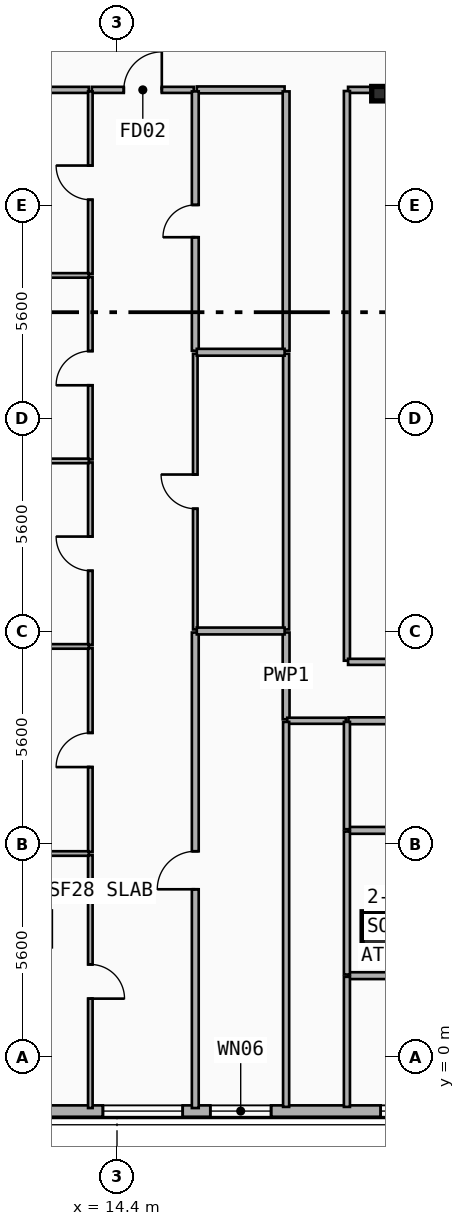
"""IFC4 building model, lengths in metres.
Left out: names, types, materials, properties, quantities, classifications, styles, units other than length and angle.
Written with IfcOpenShell. Run it as: python <this file> out.ifc"""

import sys

from ifc_helpers import new_model, si_unit, direction, frame, frame_2d, origin, origin_2d, place, context, subcontext, project, spatial, rectangle, i_section, extrude, element, fill, save


model = new_model("IFC4")
c1 = context("Model", 3, precision=1e-05, world=origin(), true_north=direction((0.0, 1.0)))
c2 = subcontext(c1, "Body", "Model", "MODEL_VIEW")
j1 = project(units=[si_unit("LENGTHUNIT", "METRE"), si_unit("PLANEANGLEUNIT", "RADIAN")], contexts=[c1])
p1 = place(None, origin())
s1 = spatial("IfcSite", under=j1, at=p1, CompositionType="ELEMENT")
p2 = place(p1, origin())
s2 = spatial("IfcBuilding", under=s1, at=p2, CompositionType="ELEMENT")
p3 = place(p2, frame((0.0, 0.0, 251.0)))
s3 = spatial("IfcBuildingStorey", under=s2, at=p3, CompositionType="ELEMENT", Elevation=251.0)
p4 = place(p3, frame((21.3, 25.35, 0.0), z_axis=(0.0, 0.0, 1.0), x_axis=(1.0, 0.0, 0.0)))
e1 = element("IfcColumn", 1, at=p4, inside=s3, PredefinedType="COLUMN", context=c2, shape_type="SweptSolid", body=[
    extrude(i_section(OverallWidth=0.395, OverallDepth=0.38, WebThickness=0.019, FlangeThickness=0.03, FilletRadius=0.015, at=origin_2d()), origin(), (0.0, 0.0, 1.0), 3.7),
])
p5 = place(p3, frame((21.3, 3.482, 0.0), z_axis=(0.0, -0.090227632116, 0.995921168769), x_axis=(1.0, 0.0, 0.0)))
e2 = element("IfcColumn", 2, at=p5, inside=s3, PredefinedType="COLUMN", context=c2, shape_type="SweptSolid", body=[
    extrude(rectangle(XDim=0.9, YDim=0.9, at=origin_2d()), origin(), (0.0, 0.0, 1.0), 3.715),
])
p6 = place(p3, frame((45.2, -1.42, 0.0), z_axis=(0.0, 0.0, 1.0), x_axis=(-1.0, 0.0, 0.0)))
e3 = element("IfcWall", 3, at=p6, inside=s3, PredefinedType="SOLIDWALL", context=c2, shape_type="SweptSolid", body=[
    extrude(rectangle(XDim=32.8, YDim=0.3, at=frame_2d((16.4, 0.0))), origin(), (0.0, 0.0, 1.0), 3.42),
])
p7 = place(p6, frame((29.071, 0.0, 0.75)))
e4 = element("IfcOpeningElement", 4, at=p7, cuts=e3, PredefinedType="OPENING", context=c2, shape_type="SweptSolid", body=[
    extrude(rectangle(XDim=2.1, YDim=2.1, at=frame_2d((1.05, 1.05))), frame((0.0, 0.16, 0.0), z_axis=(0.0, -1.0, 0.0), x_axis=(1.0, 0.0, 0.0)), (0.0, 0.0, 1.0), 0.32),
])
p8 = place(p6, frame((26.745, 0.0, 0.75)))
e5 = element("IfcOpeningElement", 5, at=p8, cuts=e3, PredefinedType="OPENING", context=c2, shape_type="SweptSolid", body=[
    extrude(rectangle(XDim=1.6, YDim=1.95, at=frame_2d((0.8, 0.975))), frame((0.0, 0.16, 0.0), z_axis=(0.0, -1.0, 0.0), x_axis=(1.0, 0.0, 0.0)), (0.0, 0.0, 1.0), 0.32),
])
p9 = place(p6, frame((18.105, 0.0, 0.75)))
e6 = element("IfcOpeningElement", 6, at=p9, cuts=e3, PredefinedType="OPENING", context=c2, shape_type="SweptSolid", body=[
    extrude(rectangle(XDim=2.1, YDim=2.1, at=frame_2d((1.05, 1.05))), frame((0.0, 0.16, 0.0), z_axis=(0.0, -1.0, 0.0), x_axis=(1.0, 0.0, 0.0)), (0.0, 0.0, 1.0), 0.32),
])
p10 = place(p6, frame((21.762, 0.0, 0.75)))
e7 = element("IfcOpeningElement", 7, at=p10, cuts=e3, PredefinedType="OPENING", context=c2, shape_type="SweptSolid", body=[
    extrude(rectangle(XDim=2.1, YDim=2.1, at=frame_2d((1.05, 1.05))), frame((0.0, 0.16, 0.0), z_axis=(0.0, -1.0, 0.0), x_axis=(1.0, 0.0, 0.0)), (0.0, 0.0, 1.0), 0.32),
])
p11 = place(p6, frame((11.364, 0.0, 0.75)))
e8 = element("IfcOpeningElement", 8, at=p11, cuts=e3, PredefinedType="OPENING", context=c2, shape_type="SweptSolid", body=[
    extrude(rectangle(XDim=2.1, YDim=2.1, at=frame_2d((1.05, 1.05))), frame((0.0, 0.16, 0.0), z_axis=(0.0, -1.0, 0.0), x_axis=(1.0, 0.0, 0.0)), (0.0, 0.0, 1.0), 0.32),
])
p12 = place(p6, frame((9.238, 0.0, 0.68)))
e9 = element("IfcOpeningElement", 9, at=p12, cuts=e3, PredefinedType="OPENING", context=c2, shape_type="SweptSolid", body=[
    extrude(rectangle(XDim=1.2, YDim=1.5, at=frame_2d((0.6, 0.75))), frame((0.0, 0.16, 0.0), z_axis=(0.0, -1.0, 0.0), x_axis=(1.0, 0.0, 0.0)), (0.0, 0.0, 1.0), 0.32),
])
p13 = place(p6, frame((14.669, 0.0, 0.75)))
e10 = element("IfcOpeningElement", 10, at=p13, cuts=e3, PredefinedType="OPENING", context=c2, shape_type="SweptSolid", body=[
    extrude(rectangle(XDim=2.1, YDim=2.1, at=frame_2d((1.05, 1.05))), frame((0.0, 0.16, 0.0), z_axis=(0.0, -1.0, 0.0), x_axis=(1.0, 0.0, 0.0)), (0.0, 0.0, 1.0), 0.32),
])
p14 = place(p6, frame((1.937, 0.0, 0.75)))
e11 = element("IfcOpeningElement", 11, at=p14, cuts=e3, PredefinedType="OPENING", context=c2, shape_type="SweptSolid", body=[
    extrude(rectangle(XDim=2.1, YDim=2.1, at=frame_2d((1.05, 1.05))), frame((0.0, 0.16, 0.0), z_axis=(0.0, -1.0, 0.0), x_axis=(1.0, 0.0, 0.0)), (0.0, 0.0, 1.0), 0.32),
])
p15 = place(p6, frame((4.709, 0.0, 0.8)))
e12 = element("IfcOpeningElement", 12, at=p15, cuts=e3, PredefinedType="OPENING", context=c2, shape_type="SweptSolid", body=[
    extrude(rectangle(XDim=1.8, YDim=1.8, at=frame_2d((0.9, 0.9))), frame((0.0, 0.16, 0.0), z_axis=(0.0, -1.0, 0.0), x_axis=(1.0, 0.0, 0.0)), (0.0, 0.0, 1.0), 0.32),
])
p16 = place(p3, frame((13.738, 25.45, 0.0), z_axis=(0.0, 0.0, 1.0), x_axis=(1.0, 0.0, 0.0)))
e13 = element("IfcWall", 13, at=p16, inside=s3, PredefinedType="PARTITIONING", context=c2, shape_type="SweptSolid", body=[
    extrude(rectangle(XDim=2.682, YDim=0.16, at=frame_2d((1.341, 0.0))), origin(), (0.0, 0.0, 1.0), 3.42),
])
p17 = place(p16, frame((0.841, 0.0, 0.0)))
e14 = element("IfcOpeningElement", 14, at=p17, cuts=e13, PredefinedType="OPENING", context=c2, shape_type="SweptSolid", body=[
    extrude(rectangle(XDim=1.0, YDim=2.15, at=frame_2d((0.5, 1.075))), frame((0.0, 0.09, 0.0), z_axis=(0.0, -1.0, 0.0), x_axis=(1.0, 0.0, 0.0)), (0.0, 0.0, 1.0), 0.18),
])
p18 = place(p3, frame((16.5, 25.45, 0.0), z_axis=(0.0, 0.0, 1.0), x_axis=(1.0, 0.0, 0.0)))
e15 = element("IfcWall", 15, at=p18, inside=s3, PredefinedType="PLUMBINGWALL", context=c2, shape_type="SweptSolid", body=[
    extrude(rectangle(XDim=2.31, YDim=0.18, at=frame_2d((1.155, 0.0))), origin(), (0.0, 0.0, 1.0), 3.42),
])
p19 = place(p3, frame((8.46, 25.45, 0.0), z_axis=(0.0, 0.0, 1.0), x_axis=(1.0, 0.0, 0.0)))
e16 = element("IfcWall", 16, at=p19, inside=s3, PredefinedType="PARTITIONING", context=c2, shape_type="SweptSolid", body=[
    extrude(rectangle(XDim=5.198, YDim=0.16, at=frame_2d((2.599, 0.0))), origin(), (0.0, 0.0, 1.0), 2.7),
])
p20 = place(p3, frame((18.85, 8.89, 0.0), z_axis=(0.0, 0.0, 1.0), x_axis=(0.0, 1.0, 0.0)))
e17 = element("IfcWall", 17, at=p20, inside=s3, PredefinedType="PLUMBINGWALL", context=c2, shape_type="SweptSolid", body=[
    extrude(rectangle(XDim=2.282, YDim=0.18, at=frame_2d((1.141, 0.0))), origin(), (0.0, 0.0, 1.0), 2.9),
])
p21 = place(p3, frame((18.85, 11.252, 0.0), z_axis=(0.0, 0.0, 1.0), x_axis=(0.0, 1.0, 0.0)))
e18 = element("IfcWall", 18, at=p21, inside=s3, PredefinedType="PARTITIONING", context=c2, shape_type="SweptSolid", body=[
    extrude(rectangle(XDim=7.254, YDim=0.16, at=frame_2d((3.627, 0.0))), origin(), (0.0, 0.0, 1.0), 2.9),
])
p22 = place(p3, frame((18.85, 18.586, 0.0), z_axis=(0.0, 0.0, 1.0), x_axis=(0.0, 1.0, 0.0)))
e19 = element("IfcWall", 19, at=p22, inside=s3, PredefinedType="PLUMBINGWALL", context=c2, shape_type="SweptSolid", body=[
    extrude(rectangle(XDim=6.824, YDim=0.18, at=frame_2d((3.412, 0.0))), origin(), (0.0, 0.0, 1.0), 2.9),
])
p23 = place(p3, frame((20.49, 8.85, 0.0), z_axis=(0.0, 0.0, 1.0), x_axis=(1.0, 0.0, 0.0)))
e20 = element("IfcWall", 20, at=p23, inside=s3, PredefinedType="PLUMBINGWALL", context=c2, shape_type="SweptSolid", body=[
    extrude(rectangle(XDim=3.796, YDim=0.18, at=frame_2d((1.898, 0.0))), origin(), (0.0, 0.0, 1.0), 2.7),
])
p24 = place(p3, frame((16.46, -1.34, 0.0), z_axis=(0.0, 0.0, 1.0), x_axis=(0.0, 1.0, 0.0)))
e21 = element("IfcWall", 21, at=p24, inside=s3, PredefinedType="PLUMBINGWALL", context=c2, shape_type="SweptSolid", body=[
    extrude(rectangle(XDim=12.512, YDim=0.18, at=frame_2d((6.256, 0.0))), origin(), (0.0, 0.0, 1.0), 2.9),
])
p25 = place(p24, frame((5.756, 0.0, 0.0)))
e22 = element("IfcOpeningElement", 22, at=p25, cuts=e21, PredefinedType="OPENING", context=c2, shape_type="SweptSolid", body=[
    extrude(rectangle(XDim=1.0, YDim=2.15, at=frame_2d((0.5, 1.075))), frame((0.0, 0.1, 0.0), z_axis=(0.0, -1.0, 0.0), x_axis=(1.0, 0.0, 0.0)), (0.0, 0.0, 1.0), 0.2),
])
p26 = place(p3, frame((16.46, 11.252, 0.0), z_axis=(0.0, 0.0, 1.0), x_axis=(0.0, 1.0, 0.0)))
e23 = element("IfcWall", 23, at=p26, inside=s3, PredefinedType="PARTITIONING", context=c2, shape_type="SweptSolid", body=[
    extrude(rectangle(XDim=7.254, YDim=0.12, at=frame_2d((3.627, 0.0))), origin(), (0.0, 0.0, 1.0), 2.9),
])
p27 = place(p26, frame((3.177, 0.0, 0.0)))
e24 = element("IfcOpeningElement", 24, at=p27, cuts=e23, PredefinedType="OPENING", context=c2, shape_type="SweptSolid", body=[
    extrude(rectangle(XDim=0.9, YDim=2.1, at=frame_2d((0.45, 1.05))), frame((0.0, 0.07, 0.0), z_axis=(0.0, -1.0, 0.0), x_axis=(1.0, 0.0, 0.0)), (0.0, 0.0, 1.0), 0.14),
])
p28 = place(p3, frame((16.46, 18.586, 0.0), z_axis=(0.0, 0.0, 1.0), x_axis=(0.0, 1.0, 0.0)))
e25 = element("IfcWall", 25, at=p28, inside=s3, PredefinedType="PLUMBINGWALL", context=c2, shape_type="SweptSolid", body=[
    extrude(rectangle(XDim=6.824, YDim=0.18, at=frame_2d((3.412, 0.0))), origin(), (0.0, 0.0, 1.0), 2.9),
])
p29 = place(p28, frame((2.987, 0.0, 0.0)))
e26 = element("IfcOpeningElement", 26, at=p29, cuts=e25, PredefinedType="OPENING", context=c2, shape_type="SweptSolid", body=[
    extrude(rectangle(XDim=0.85, YDim=2.1, at=frame_2d((0.425, 1.05))), frame((0.0, 0.1, 0.0), z_axis=(0.0, -1.0, 0.0), x_axis=(1.0, 0.0, 0.0)), (0.0, 0.0, 1.0), 0.2),
])
p30 = place(p3, frame((13.698, 5.317, 0.0), z_axis=(0.0, 0.0, 1.0), x_axis=(0.0, -1.0, 0.0)))
e27 = element("IfcWall", 27, at=p30, inside=s3, PredefinedType="PARTITIONING", context=c2, shape_type="SweptSolid", body=[
    extrude(rectangle(XDim=6.657, YDim=0.12, at=frame_2d((3.329, 0.0))), origin(), (0.0, 0.0, 1.0), 3.08),
])
p31 = place(p30, frame((2.878, 0.0, 0.0)))
e28 = element("IfcOpeningElement", 28, at=p31, cuts=e27, PredefinedType="OPENING", context=c2, shape_type="SweptSolid", body=[
    extrude(rectangle(XDim=0.9, YDim=2.1, at=frame_2d((0.45, 1.05))), frame((0.0, 0.07, 0.0), z_axis=(0.0, -1.0, 0.0), x_axis=(1.0, 0.0, 0.0)), (0.0, 0.0, 1.0), 0.14),
])
p32 = place(p3, frame((13.698, 5.397, 0.0), z_axis=(0.0, 0.0, 1.0), x_axis=(0.0, 1.0, 0.0)))
e29 = element("IfcWall", 29, at=p32, inside=s3, PredefinedType="PARTITIONING", context=c2, shape_type="SweptSolid", body=[
    extrude(rectangle(XDim=5.369, YDim=0.12, at=frame_2d((2.685, 0.0))), origin(), (0.0, 0.0, 1.0), 2.9),
])
p33 = place(p32, frame((2.235, 0.0, 0.0)))
e30 = element("IfcOpeningElement", 30, at=p33, cuts=e29, PredefinedType="OPENING", context=c2, shape_type="SweptSolid", body=[
    extrude(rectangle(XDim=0.9, YDim=2.1, at=frame_2d((0.45, 1.05))), frame((0.0, 0.07, 0.0), z_axis=(0.0, -1.0, 0.0), x_axis=(1.0, 0.0, 0.0)), (0.0, 0.0, 1.0), 0.14),
])
p34 = place(p3, frame((13.698, 10.846, 0.0), z_axis=(0.0, 0.0, 1.0), x_axis=(0.0, 1.0, 0.0)))
e31 = element("IfcWall", 31, at=p34, inside=s3, PredefinedType="PARTITIONING", context=c2, shape_type="SweptSolid", body=[
    extrude(rectangle(XDim=4.801, YDim=0.12, at=frame_2d((2.4, 0.0))), origin(), (0.0, 0.0, 1.0), 2.9),
])
p35 = place(p34, frame((1.95, 0.0, 0.0)))
e32 = element("IfcOpeningElement", 32, at=p35, cuts=e31, PredefinedType="OPENING", context=c2, shape_type="SweptSolid", body=[
    extrude(rectangle(XDim=0.9, YDim=2.1, at=frame_2d((0.45, 1.05))), frame((0.0, 0.07, 0.0), z_axis=(0.0, -1.0, 0.0), x_axis=(1.0, 0.0, 0.0)), (0.0, 0.0, 1.0), 0.14),
])
p36 = place(p3, frame((13.698, 15.727, 0.0), z_axis=(0.0, 0.0, 1.0), x_axis=(0.0, 1.0, 0.0)))
e33 = element("IfcWall", 33, at=p36, inside=s3, PredefinedType="PARTITIONING", context=c2, shape_type="SweptSolid", body=[
    extrude(rectangle(XDim=4.801, YDim=0.12, at=frame_2d((2.4, 0.0))), origin(), (0.0, 0.0, 1.0), 2.9),
])
p37 = place(p36, frame((1.95, 0.0, 0.0)))
e34 = element("IfcOpeningElement", 34, at=p37, cuts=e33, PredefinedType="OPENING", context=c2, shape_type="SweptSolid", body=[
    extrude(rectangle(XDim=0.9, YDim=2.1, at=frame_2d((0.45, 1.05))), frame((0.0, 0.07, 0.0), z_axis=(0.0, -1.0, 0.0), x_axis=(1.0, 0.0, 0.0)), (0.0, 0.0, 1.0), 0.14),
])
p38 = place(p3, frame((13.698, 20.608, 0.0), z_axis=(0.0, 0.0, 1.0), x_axis=(0.0, 1.0, 0.0)))
e35 = element("IfcWall", 35, at=p38, inside=s3, PredefinedType="PARTITIONING", context=c2, shape_type="SweptSolid", body=[
    extrude(rectangle(XDim=4.802, YDim=0.12, at=frame_2d((2.401, 0.0))), origin(), (0.0, 0.0, 1.0), 3.05),
])
p39 = place(p38, frame((1.951, 0.0, 0.0)))
e36 = element("IfcOpeningElement", 36, at=p39, cuts=e35, PredefinedType="OPENING", context=c2, shape_type="SweptSolid", body=[
    extrude(rectangle(XDim=0.9, YDim=2.1, at=frame_2d((0.45, 1.05))), frame((0.0, 0.07, 0.0), z_axis=(0.0, -1.0, 0.0), x_axis=(1.0, 0.0, 0.0)), (0.0, 0.0, 1.0), 0.14),
])
p40 = place(p3, frame((16.5, 11.212, 0.0), z_axis=(0.0, 0.0, 1.0), x_axis=(1.0, 0.0, 0.0)))
e37 = element("IfcWall", 37, at=p40, inside=s3, PredefinedType="PLUMBINGWALL", context=c2, shape_type="SweptSolid", body=[
    extrude(rectangle(XDim=2.31, YDim=0.18, at=frame_2d((1.155, 0.0))), origin(), (0.0, 0.0, 1.0), 2.9),
])
p41 = place(p3, frame((16.5, 18.546, 0.0), z_axis=(0.0, 0.0, 1.0), x_axis=(1.0, 0.0, 0.0)))
e38 = element("IfcWall", 38, at=p41, inside=s3, PredefinedType="PLUMBINGWALL", context=c2, shape_type="SweptSolid", body=[
    extrude(rectangle(XDim=2.31, YDim=0.18, at=frame_2d((1.155, 0.0))), origin(), (0.0, 0.0, 1.0), 3.42),
])
for number, where, z_axis, x_axis in (
    (39, (8.46, 5.357, 0.0), (0.0, 0.0, 1.0), (1.0, 0.0, 0.0)),
    (40, (8.46, 10.806, 0.0), (0.0, 0.0, 1.0), (1.0, 0.0, 0.0)),
    (41, (8.46, 15.687, 0.0), (0.0, 0.0, 1.0), (1.0, 0.0, 0.0)),
    (42, (8.46, 20.568, 0.0), (0.0, 0.0, 1.0), (1.0, 0.0, 0.0)),
):
    element("IfcWall", number, at=place(p3, frame(where, z_axis=z_axis, x_axis=x_axis)), inside=s3, PredefinedType="PARTITIONING", context=c2, shape_type="SweptSolid", body=[
        extrude(rectangle(XDim=5.198, YDim=0.12, at=frame_2d((2.599, 0.0))), origin(), (0.0, 0.0, 1.0), 2.7),
    ])
p42 = place(p3, frame((20.49, 2.143, 0.0), z_axis=(0.0, 0.0, 1.0), x_axis=(1.0, 0.0, 0.0)))
e43 = element("IfcWall", 43, at=p42, inside=s3, PredefinedType="PLUMBINGWALL", context=c2, shape_type="SweptSolid", body=[
    extrude(rectangle(XDim=3.796, YDim=0.18, at=frame_2d((1.898, 0.0))), origin(), (0.0, 0.0, 1.0), 3.42),
])
p43 = place(p3, frame((20.49, 5.966, 0.0), z_axis=(0.0, 0.0, 1.0), x_axis=(1.0, 0.0, 0.0)))
e44 = element("IfcWall", 44, at=p43, inside=s3, PredefinedType="PLUMBINGWALL", context=c2, shape_type="SweptSolid", body=[
    extrude(rectangle(XDim=3.796, YDim=0.18, at=frame_2d((1.898, 0.0))), origin(), (0.0, 0.0, 1.0), 2.7),
])
p44 = place(p3, frame((20.48, 25.45, 0.0), z_axis=(0.0, 0.0, 1.0), x_axis=(1.0, 0.0, 0.0)))
e45 = element("IfcWall", 45, at=p44, inside=s3, PredefinedType="PARTITIONING", context=c2, shape_type="SweptSolid", body=[
    extrude(rectangle(XDim=15.84, YDim=0.16, at=frame_2d((7.92, 0.0))), origin(), (0.0, 0.0, 1.0), 2.7),
])
p45 = place(p3, frame((18.88, 8.85, 0.0), z_axis=(0.0, 0.0, 1.0), x_axis=(1.0, 0.0, 0.0)))
e46 = element("IfcWall", 46, at=p45, inside=s3, PredefinedType="PARTITIONING", context=c2, shape_type="SweptSolid", body=[
    extrude(rectangle(XDim=1.54, YDim=0.16, at=frame_2d((0.77, 0.0))), origin(), (0.0, 0.0, 1.0), 3.42),
])
p46 = place(p3, frame((20.45, 10.43, 0.0), z_axis=(0.0, 0.0, 1.0), x_axis=(0.0, 1.0, 0.0)))
e47 = element("IfcWall", 47, at=p46, inside=s3, PredefinedType="PARTITIONING", context=c2, shape_type="SweptSolid", body=[
    extrude(rectangle(XDim=14.99, YDim=0.16, at=frame_2d((7.495, 0.0))), origin(), (0.0, 0.0, 1.0), 2.9),
])
p47 = place(p3, frame((20.48, 10.4, 0.0), z_axis=(0.0, 0.0, 1.0), x_axis=(1.0, 0.0, 0.0)))
e48 = element("IfcWall", 48, at=p47, inside=s3, PredefinedType="PARTITIONING", context=c2, shape_type="SweptSolid", body=[
    extrude(rectangle(XDim=2.64, YDim=0.16, at=frame_2d((1.32, 0.0))), origin(), (0.0, 0.0, 1.0), 2.7),
])
p48 = place(p3, frame((18.85, -1.31, 0.0), z_axis=(0.0, 0.0, 1.0), x_axis=(0.0, 1.0, 0.0)))
e49 = element("IfcWall", 49, at=p48, inside=s3, PredefinedType="PARTITIONING", context=c2, shape_type="SweptSolid", body=[
    extrude(rectangle(XDim=10.13, YDim=0.16, at=frame_2d((5.065, 0.0))), origin(), (0.0, 0.0, 1.0), 3.05),
])
p49 = place(p3, frame((20.45, -1.31, 0.0), z_axis=(0.0, 0.0, 1.0), x_axis=(0.0, 1.0, 0.0)))
e50 = element("IfcWall", 50, at=p49, inside=s3, PredefinedType="PARTITIONING", context=c2, shape_type="SweptSolid", body=[
    extrude(rectangle(XDim=3.423, YDim=0.16, at=frame_2d((1.711, 0.0))), origin(), (0.0, 0.0, 1.0), 3.42),
])
p50 = place(p3, frame((20.45, 2.173, 0.0), z_axis=(0.0, 0.0, 1.0), x_axis=(0.0, 1.0, 0.0)))
e51 = element("IfcWall", 51, at=p50, inside=s3, PredefinedType="PARTITIONING", context=c2, shape_type="SweptSolid", body=[
    extrude(rectangle(XDim=3.763, YDim=0.16, at=frame_2d((1.881, 0.0))), origin(), (0.0, 0.0, 1.0), 3.08),
])
p51 = place(p3, frame((20.45, 5.996, 0.0), z_axis=(0.0, 0.0, 1.0), x_axis=(0.0, 1.0, 0.0)))
e52 = element("IfcWall", 52, at=p51, inside=s3, PredefinedType="PARTITIONING", context=c2, shape_type="SweptSolid", body=[
    extrude(rectangle(XDim=2.824, YDim=0.16, at=frame_2d((1.412, 0.0))), origin(), (0.0, 0.0, 1.0), 3.05),
])
p52 = place(p7, origin())
e53 = element("IfcWindow", 53, at=p52, inside=s3, PartitioningType="SINGLE_PANEL", PredefinedType="WINDOW", context=c2, shape_type="SweptSolid", body=[
    extrude(rectangle(XDim=2.1, YDim=2.1, at=frame_2d((1.05, 1.05))), frame((0.0, 0.03, 0.0), z_axis=(0.0, -1.0, 0.0), x_axis=(1.0, 0.0, 0.0)), (0.0, 0.0, 1.0), 0.06),
])
fill(e4, e53)
p53 = place(p8, origin())
e54 = element("IfcWindow", 54, at=p53, inside=s3, PartitioningType="SINGLE_PANEL", PredefinedType="WINDOW", context=c2, shape_type="SweptSolid", body=[
    extrude(rectangle(XDim=1.6, YDim=1.95, at=frame_2d((0.8, 0.975))), frame((0.0, 0.03, 0.0), z_axis=(0.0, -1.0, 0.0), x_axis=(1.0, 0.0, 0.0)), (0.0, 0.0, 1.0), 0.06),
])
fill(e5, e54)
p54 = place(p10, origin())
e55 = element("IfcWindow", 55, at=p54, inside=s3, PartitioningType="SINGLE_PANEL", PredefinedType="WINDOW", context=c2, shape_type="SweptSolid", body=[
    extrude(rectangle(XDim=2.1, YDim=2.1, at=frame_2d((1.05, 1.05))), frame((0.0, 0.03, 0.0), z_axis=(0.0, -1.0, 0.0), x_axis=(1.0, 0.0, 0.0)), (0.0, 0.0, 1.0), 0.06),
])
fill(e7, e55)
p55 = place(p17, origin())
e56 = element("IfcDoor", 56, at=p55, inside=s3, OperationType="SINGLE_SWING_RIGHT", PredefinedType="DOOR", context=c2, shape_type="SweptSolid", body=[
    extrude(rectangle(XDim=1.0, YDim=2.15, at=frame_2d((0.5, 1.075))), frame((0.0, 0.025, 0.0), z_axis=(0.0, -1.0, 0.0), x_axis=(1.0, 0.0, 0.0)), (0.0, 0.0, 1.0), 0.05),
])
fill(e14, e56)
p56 = place(p25, origin())
e57 = element("IfcDoor", 57, at=p56, inside=s3, OperationType="SINGLE_SWING_LEFT", PredefinedType="DOOR", context=c2, shape_type="SweptSolid", body=[
    extrude(rectangle(XDim=1.0, YDim=2.15, at=frame_2d((0.5, 1.075))), frame((0.0, 0.025, 0.0), z_axis=(0.0, -1.0, 0.0), x_axis=(1.0, 0.0, 0.0)), (0.0, 0.0, 1.0), 0.05),
])
fill(e22, e57)
p57 = place(p27, origin())
e58 = element("IfcDoor", 58, at=p57, inside=s3, OperationType="SINGLE_SWING_RIGHT", PredefinedType="DOOR", context=c2, shape_type="SweptSolid", body=[
    extrude(rectangle(XDim=0.9, YDim=2.1, at=frame_2d((0.45, 1.05))), frame((0.0, 0.025, 0.0), z_axis=(0.0, -1.0, 0.0), x_axis=(1.0, 0.0, 0.0)), (0.0, 0.0, 1.0), 0.05),
])
fill(e24, e58)
p58 = place(p29, origin())
e59 = element("IfcDoor", 59, at=p58, inside=s3, OperationType="SINGLE_SWING_LEFT", PredefinedType="DOOR", context=c2, shape_type="SweptSolid", body=[
    extrude(rectangle(XDim=0.85, YDim=2.1, at=frame_2d((0.425, 1.05))), frame((0.0, 0.025, 0.0), z_axis=(0.0, -1.0, 0.0), x_axis=(1.0, 0.0, 0.0)), (0.0, 0.0, 1.0), 0.05),
])
fill(e26, e59)
p59 = place(p31, origin())
e60 = element("IfcDoor", 60, at=p59, inside=s3, OperationType="SINGLE_SWING_RIGHT", PredefinedType="DOOR", context=c2, shape_type="SweptSolid", body=[
    extrude(rectangle(XDim=0.9, YDim=2.1, at=frame_2d((0.45, 1.05))), frame((0.0, 0.025, 0.0), z_axis=(0.0, -1.0, 0.0), x_axis=(1.0, 0.0, 0.0)), (0.0, 0.0, 1.0), 0.05),
])
fill(e28, e60)
p60 = place(p33, origin())
e61 = element("IfcDoor", 61, at=p60, inside=s3, OperationType="SINGLE_SWING_LEFT", PredefinedType="DOOR", context=c2, shape_type="SweptSolid", body=[
    extrude(rectangle(XDim=0.9, YDim=2.1, at=frame_2d((0.45, 1.05))), frame((0.0, 0.025, 0.0), z_axis=(0.0, -1.0, 0.0), x_axis=(1.0, 0.0, 0.0)), (0.0, 0.0, 1.0), 0.05),
])
fill(e30, e61)
p61 = place(p35, origin())
e62 = element("IfcDoor", 62, at=p61, inside=s3, OperationType="SINGLE_SWING_RIGHT", PredefinedType="DOOR", context=c2, shape_type="SweptSolid", body=[
    extrude(rectangle(XDim=0.9, YDim=2.1, at=frame_2d((0.45, 1.05))), frame((0.0, 0.025, 0.0), z_axis=(0.0, -1.0, 0.0), x_axis=(1.0, 0.0, 0.0)), (0.0, 0.0, 1.0), 0.05),
])
fill(e32, e62)
p62 = place(p37, origin())
e63 = element("IfcDoor", 63, at=p62, inside=s3, OperationType="SINGLE_SWING_LEFT", PredefinedType="DOOR", context=c2, shape_type="SweptSolid", body=[
    extrude(rectangle(XDim=0.9, YDim=2.1, at=frame_2d((0.45, 1.05))), frame((0.0, 0.025, 0.0), z_axis=(0.0, -1.0, 0.0), x_axis=(1.0, 0.0, 0.0)), (0.0, 0.0, 1.0), 0.05),
])
fill(e34, e63)
p63 = place(p39, origin())
e64 = element("IfcDoor", 64, at=p63, inside=s3, OperationType="SINGLE_SWING_RIGHT", PredefinedType="DOOR", context=c2, shape_type="SweptSolid", body=[
    extrude(rectangle(XDim=0.9, YDim=2.1, at=frame_2d((0.45, 1.05))), frame((0.0, 0.025, 0.0), z_axis=(0.0, -1.0, 0.0), x_axis=(1.0, 0.0, 0.0)), (0.0, 0.0, 1.0), 0.05),
])
fill(e36, e64)
save(model, sys.argv[1])
